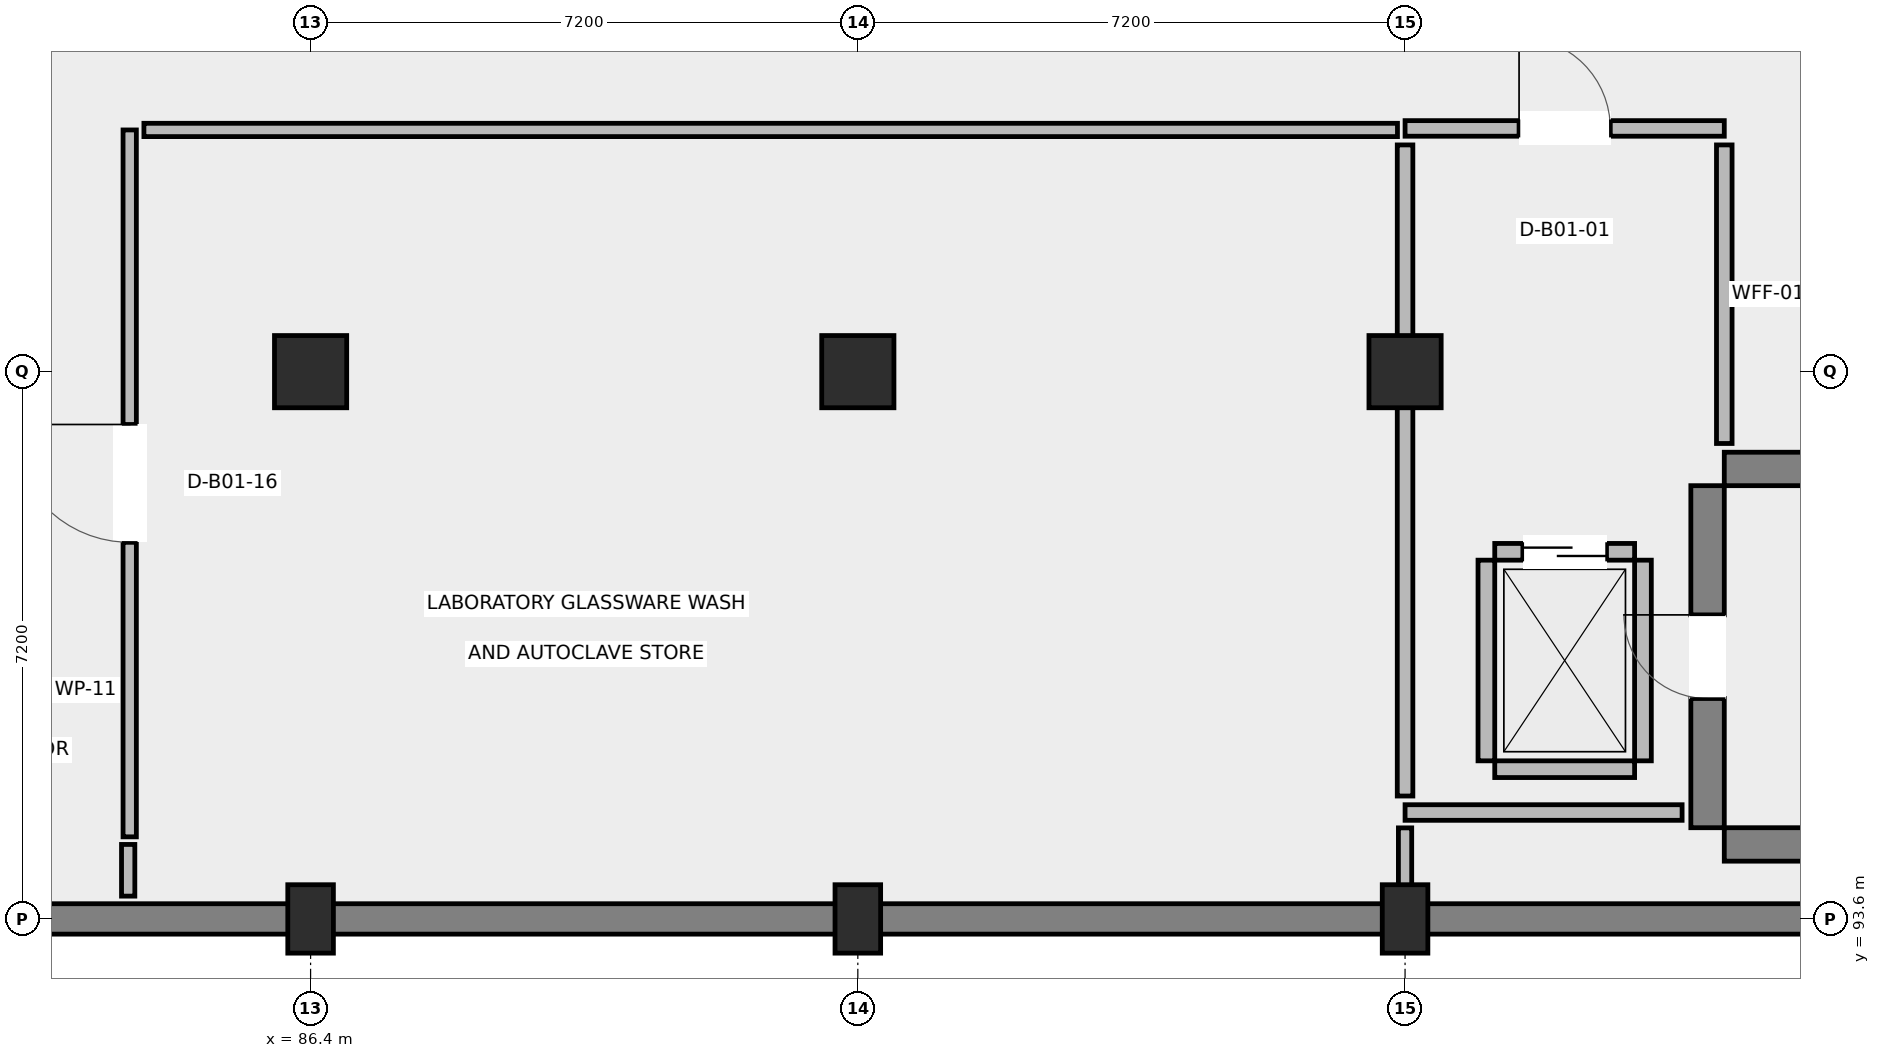
"""IFC4 building model, lengths in metres.
Left out: names, types, materials, properties, quantities, classifications, styles, units other than length and angle.
Written with IfcOpenShell. Run it as: python <this file> out.ifc"""

import sys

from ifc_helpers import new_model, si_unit, direction, frame, frame_2d, origin, origin_2d, place, context, subcontext, project, spatial, rectangle, extrude, element, fill, save


model = new_model("IFC4")
c1 = context("Model", 3, precision=1e-05, world=origin(), true_north=direction((0.0, 1.0)))
c2 = subcontext(c1, "Body", "Model", "MODEL_VIEW")
j1 = project(units=[si_unit("LENGTHUNIT", "METRE"), si_unit("PLANEANGLEUNIT", "RADIAN")], contexts=[c1])
p1 = place(None, origin())
s1 = spatial("IfcSite", under=j1, at=p1, CompositionType="ELEMENT")
p2 = place(p1, origin())
s2 = spatial("IfcBuilding", under=s1, at=p2, CompositionType="ELEMENT")
p3 = place(p2, frame((0.0, 0.0, -4.5)))
s3 = spatial("IfcBuildingStorey", under=s2, at=p3, CompositionType="ELEMENT", Elevation=-4.5)
p4 = place(p3, frame((86.4, 93.6, 0.0), z_axis=(0.0, 0.0, 1.0), x_axis=(1.0, 0.0, 0.0)))
e1 = element("IfcColumn", 1, at=p4, inside=s3, PredefinedType="COLUMN", context=c2, shape_type="SweptSolid", body=[
    extrude(rectangle(XDim=0.6, YDim=0.9, at=origin_2d()), origin(), (0.0, 0.0, 1.0), 4.15),
])
p5 = place(p3, frame((86.4, 100.8, 0.0), z_axis=(0.0, 0.0, 1.0), x_axis=(1.0, 0.0, 0.0)))
e2 = element("IfcColumn", 2, at=p5, inside=s3, PredefinedType="COLUMN", context=c2, shape_type="SweptSolid", body=[
    extrude(rectangle(XDim=0.95, YDim=0.95, at=origin_2d()), origin(), (0.0, 0.0, 1.0), 4.15),
])
p6 = place(p3, frame((93.6, 93.6, 0.0), z_axis=(0.0, 0.0, 1.0), x_axis=(1.0, 0.0, 0.0)))
e3 = element("IfcColumn", 3, at=p6, inside=s3, PredefinedType="COLUMN", context=c2, shape_type="SweptSolid", body=[
    extrude(rectangle(XDim=0.6, YDim=0.9, at=origin_2d()), origin(), (0.0, 0.0, 1.0), 4.15),
])
p7 = place(p3, frame((93.6, 100.8, 0.0), z_axis=(0.0, 0.0, 1.0), x_axis=(1.0, 0.0, 0.0)))
e4 = element("IfcColumn", 4, at=p7, inside=s3, PredefinedType="COLUMN", context=c2, shape_type="SweptSolid", body=[
    extrude(rectangle(XDim=0.95, YDim=0.95, at=origin_2d()), origin(), (0.0, 0.0, 1.0), 4.15),
])
p8 = place(p3, frame((100.8, 93.6, 0.0), z_axis=(0.0, 0.0, 1.0), x_axis=(1.0, 0.0, 0.0)))
e5 = element("IfcColumn", 5, at=p8, inside=s3, PredefinedType="COLUMN", context=c2, shape_type="SweptSolid", body=[
    extrude(rectangle(XDim=0.6, YDim=0.9, at=origin_2d()), origin(), (0.0, 0.0, 1.0), 4.15),
])
p9 = place(p3, frame((100.8, 100.8, 0.0), z_axis=(0.0, 0.0, 1.0), x_axis=(1.0, 0.0, 0.0)))
e6 = element("IfcColumn", 6, at=p9, inside=s3, PredefinedType="COLUMN", context=c2, shape_type="SweptSolid", body=[
    extrude(rectangle(XDim=0.95, YDim=0.95, at=origin_2d()), origin(), (0.0, 0.0, 1.0), 4.15),
])
p10 = place(p3, frame((136.8, 93.6, 0.0), z_axis=(0.0, 0.0, 1.0), x_axis=(-1.0, 0.0, 0.0)))
e7 = element("IfcWall", 7, at=p10, inside=s3, PredefinedType="SOLIDWALL", context=c2, shape_type="SweptSolid", body=[
    extrude(rectangle(XDim=79.2, YDim=0.4, at=frame_2d((39.6, 0.0))), origin(), (0.0, 0.0, 1.0), 4.15),
])
for number, where, z_axis, x_axis in (
    (8, (105.0, 94.58, 0.0), (0.0, 0.0, 1.0), (1.0, 0.0, 0.0)),
    (9, (105.0, 99.52, 0.0), (0.0, 0.0, 1.0), (1.0, 0.0, 0.0)),
):
    element("IfcWall", number, at=place(p3, frame(where, z_axis=z_axis, x_axis=x_axis)), inside=s3, PredefinedType="SHEAR", context=c2, shape_type="SweptSolid", body=[
        extrude(rectangle(XDim=9.5, YDim=0.44, at=frame_2d((4.75, 0.0))), origin(), (0.0, 0.0, 1.0), 4.15),
    ])
p11 = place(p3, frame((104.78, 94.8, 0.0), z_axis=(0.0, 0.0, 1.0), x_axis=(0.0, 1.0, 0.0)))
e10 = element("IfcWall", 10, at=p11, inside=s3, PredefinedType="SHEAR", context=c2, shape_type="SweptSolid", body=[
    extrude(rectangle(XDim=4.5, YDim=0.44, at=frame_2d((2.25, 0.0))), origin(), (0.0, 0.0, 1.0), 4.15),
])
p12 = place(p11, frame((1.7, 0.0, 0.0)))
e11 = element("IfcOpeningElement", 11, at=p12, cuts=e10, PredefinedType="OPENING", context=c2, shape_type="SweptSolid", body=[
    extrude(rectangle(XDim=1.1, YDim=2.15, at=frame_2d((0.55, 1.075))), frame((0.0, 0.23, 0.0), z_axis=(0.0, -1.0, 0.0), x_axis=(1.0, 0.0, 0.0)), (0.0, 0.0, 1.0), 0.46),
])
p13 = place(p3, frame((101.98, 95.57, 0.0), z_axis=(0.0, 0.0, 1.0), x_axis=(1.0, 0.0, 0.0)))
e12 = element("IfcWall", 12, at=p13, inside=s3, PredefinedType="STANDARD", context=c2, shape_type="SweptSolid", body=[
    extrude(rectangle(XDim=1.84, YDim=0.22, at=frame_2d((0.92, 0.0))), origin(), (0.0, 0.0, 1.0), 3.19),
])
p14 = place(p3, frame((101.98, 98.43, 0.0), z_axis=(0.0, 0.0, 1.0), x_axis=(1.0, 0.0, 0.0)))
e13 = element("IfcWall", 13, at=p14, inside=s3, PredefinedType="STANDARD", context=c2, shape_type="SweptSolid", body=[
    extrude(rectangle(XDim=1.84, YDim=0.22, at=frame_2d((0.92, 0.0))), origin(), (0.0, 0.0, 1.0), 3.19),
])
p15 = place(p14, frame((0.37, 0.0, 0.0)))
e14 = element("IfcOpeningElement", 14, at=p15, cuts=e13, PredefinedType="OPENING", context=c2, shape_type="SweptSolid", body=[
    extrude(rectangle(XDim=1.1, YDim=2.15, at=frame_2d((0.55, 1.075))), frame((0.0, 0.12, 0.0), z_axis=(0.0, -1.0, 0.0), x_axis=(1.0, 0.0, 0.0)), (0.0, 0.0, 1.0), 0.24),
])
for number, where, z_axis, x_axis in (
    (15, (101.87, 95.68, 0.0), (0.0, 0.0, 1.0), (0.0, 1.0, 0.0)),
    (16, (103.93, 95.68, 0.0), (0.0, 0.0, 1.0), (0.0, 1.0, 0.0)),
):
    element("IfcWall", number, at=place(p3, frame(where, z_axis=z_axis, x_axis=x_axis)), inside=s3, PredefinedType="STANDARD", context=c2, shape_type="SweptSolid", body=[
        extrude(rectangle(XDim=2.64, YDim=0.22, at=frame_2d((1.32, 0.0))), origin(), (0.0, 0.0, 1.0), 3.19),
    ])
p16 = place(p3, frame((100.8, 104.0, 0.0), z_axis=(0.0, 0.0, 1.0), x_axis=(1.0, 0.0, 0.0)))
e17 = element("IfcWall", 17, at=p16, inside=s3, PredefinedType="PARTITIONING", context=c2, shape_type="SweptSolid", body=[
    extrude(rectangle(XDim=4.2, YDim=0.205, at=frame_2d((2.1, 0.0))), origin(), (0.0, 0.0, 1.0), 3.19),
])
p17 = place(p16, frame((1.5, 0.0, 0.0)))
e18 = element("IfcOpeningElement", 18, at=p17, cuts=e17, PredefinedType="OPENING", context=c2, shape_type="SweptSolid", body=[
    extrude(rectangle(XDim=1.2, YDim=2.15, at=frame_2d((0.6, 1.075))), frame((0.0, 0.113, 0.0), z_axis=(0.0, -1.0, 0.0), x_axis=(1.0, 0.0, 0.0)), (0.0, 0.0, 1.0), 0.225),
])
p18 = place(p3, frame((105.0, 103.783, 0.0), z_axis=(0.0, 0.0, 1.0), x_axis=(0.0, -1.0, 0.0)))
e19 = element("IfcWall", 19, at=p18, inside=s3, PredefinedType="PARTITIONING", context=c2, shape_type="SweptSolid", body=[
    extrude(rectangle(XDim=3.928, YDim=0.205, at=frame_2d((1.964, 0.0))), origin(), (0.0, 0.0, 1.0), 3.19),
])
p19 = place(p3, frame((104.445, 95.0, 0.0), z_axis=(0.0, 0.0, 1.0), x_axis=(-1.0, 0.0, 0.0)))
e20 = element("IfcWall", 20, at=p19, inside=s3, PredefinedType="PARTITIONING", context=c2, shape_type="SweptSolid", body=[
    extrude(rectangle(XDim=3.645, YDim=0.205, at=frame_2d((1.823, 0.0))), origin(), (0.0, 0.0, 1.0), 3.19),
])
p20 = place(p3, frame((100.8, 95.217, 0.0), z_axis=(0.0, 0.0, 1.0), x_axis=(0.0, 1.0, 0.0)))
e21 = element("IfcWall", 21, at=p20, inside=s3, PredefinedType="PARTITIONING", context=c2, shape_type="SweptSolid", body=[
    extrude(rectangle(XDim=8.566, YDim=0.205, at=frame_2d((4.283, 0.0))), origin(), (0.0, 0.0, 1.0), 3.19),
])
p21 = place(p3, frame((84.0, 93.9, 0.0), z_axis=(0.0, 0.0, 1.0), x_axis=(0.0, 1.0, 0.0)))
e22 = element("IfcWall", 22, at=p21, inside=s3, PredefinedType="PARTITIONING", context=c2, shape_type="SweptSolid", body=[
    extrude(rectangle(XDim=0.68, YDim=0.175, at=frame_2d((0.34, 0.0))), origin(), (0.0, 0.0, 1.0), 3.19),
])
p22 = place(p3, frame((84.02, 94.68, 0.0), z_axis=(0.0, 0.0, 1.0), x_axis=(0.0, 1.0, 0.0)))
e23 = element("IfcWall", 23, at=p22, inside=s3, PredefinedType="PARTITIONING", context=c2, shape_type="SweptSolid", body=[
    extrude(rectangle(XDim=9.3, YDim=0.175, at=frame_2d((4.65, 0.0))), origin(), (0.0, 0.0, 1.0), 3.19),
])
p23 = place(p22, frame((3.875, 0.0, 0.0)))
e24 = element("IfcOpeningElement", 24, at=p23, cuts=e23, PredefinedType="OPENING", context=c2, shape_type="SweptSolid", body=[
    extrude(rectangle(XDim=1.55, YDim=2.2, at=frame_2d((0.775, 1.1))), frame((0.0, 0.097, 0.0), z_axis=(0.0, -1.0, 0.0), x_axis=(1.0, 0.0, 0.0)), (0.0, 0.0, 1.0), 0.195),
])
p24 = place(p3, frame((84.207, 103.98, 0.0), z_axis=(0.0, 0.0, 1.0), x_axis=(1.0, 0.0, 0.0)))
e25 = element("IfcWall", 25, at=p24, inside=s3, PredefinedType="PARTITIONING", context=c2, shape_type="SweptSolid", body=[
    extrude(rectangle(XDim=16.493, YDim=0.175, at=frame_2d((8.247, 0.0))), origin(), (0.0, 0.0, 1.0), 3.19),
])
p25 = place(p3, frame((100.8, 94.798, 0.0), z_axis=(0.0, 0.0, 1.0), x_axis=(0.0, -1.0, 0.0)))
e26 = element("IfcWall", 26, at=p25, inside=s3, PredefinedType="PARTITIONING", context=c2, shape_type="SweptSolid", body=[
    extrude(rectangle(XDim=0.898, YDim=0.175, at=frame_2d((0.449, 0.0))), origin(), (0.0, 0.0, 1.0), 3.19),
])
p26 = place(p12, origin())
e27 = element("IfcDoor", 27, at=p26, inside=s3, OperationType="SINGLE_SWING_RIGHT", PredefinedType="DOOR", context=c2, shape_type="SweptSolid", body=[
    extrude(rectangle(XDim=1.1, YDim=2.15, at=frame_2d((0.55, 1.075))), frame((0.0, 0.025, 0.0), z_axis=(0.0, -1.0, 0.0), x_axis=(1.0, 0.0, 0.0)), (0.0, 0.0, 1.0), 0.05),
])
fill(e11, e27)
p27 = place(p15, origin())
e28 = element("IfcDoor", 28, at=p27, inside=s3, OperationType="SLIDING_TO_RIGHT", PredefinedType="DOOR", context=c2, shape_type="SweptSolid", body=[
    extrude(rectangle(XDim=1.1, YDim=2.15, at=frame_2d((0.55, 1.075))), frame((0.0, 0.025, 0.0), z_axis=(0.0, -1.0, 0.0), x_axis=(1.0, 0.0, 0.0)), (0.0, 0.0, 1.0), 0.05),
])
fill(e14, e28)
p28 = place(p17, origin())
e29 = element("IfcDoor", 29, at=p28, inside=s3, OperationType="SINGLE_SWING_LEFT", PredefinedType="DOOR", context=c2, shape_type="SweptSolid", body=[
    extrude(rectangle(XDim=1.2, YDim=2.15, at=frame_2d((0.6, 1.075))), frame((0.0, 0.025, 0.0), z_axis=(0.0, -1.0, 0.0), x_axis=(1.0, 0.0, 0.0)), (0.0, 0.0, 1.0), 0.05),
])
fill(e18, e29)
p29 = place(p23, origin())
e30 = element("IfcDoor", 30, at=p29, inside=s3, OperationType="SINGLE_SWING_RIGHT", PredefinedType="DOOR", context=c2, shape_type="SweptSolid", body=[
    extrude(rectangle(XDim=1.55, YDim=2.2, at=frame_2d((0.775, 1.1))), frame((0.0, 0.025, 0.0), z_axis=(0.0, -1.0, 0.0), x_axis=(1.0, 0.0, 0.0)), (0.0, 0.0, 1.0), 0.05),
])
fill(e24, e30)
save(model, sys.argv[1])
